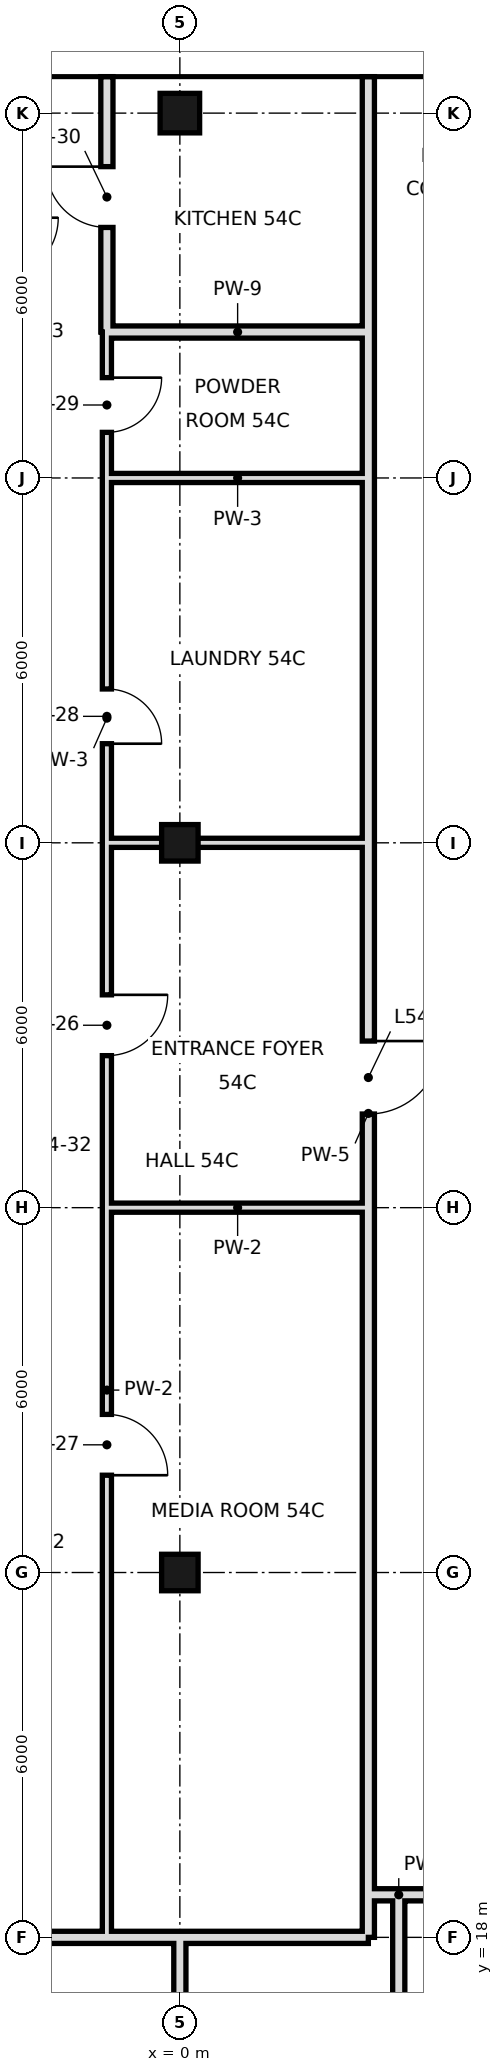
"""IFC4 building model, lengths in metres.
Left out: names, types, materials, properties, quantities, classifications, styles, units other than length and angle.
Written with IfcOpenShell. Run it as: python <this file> out.ifc"""

import sys

from ifc_helpers import new_model, si_unit, direction, frame, frame_2d, origin, origin_2d, place, context, subcontext, project, spatial, rectangle, hollow_rectangle, extrude, element, fill, save


model = new_model("IFC4")
c1 = context("Model", 3, precision=1e-05, world=origin(), true_north=direction((0.0, 1.0)))
c2 = subcontext(c1, "Body", "Model", "MODEL_VIEW")
j1 = project(units=[si_unit("LENGTHUNIT", "METRE"), si_unit("PLANEANGLEUNIT", "RADIAN")], contexts=[c1])
p1 = place(None, origin())
s1 = spatial("IfcSite", under=j1, at=p1, CompositionType="ELEMENT")
p2 = place(p1, origin())
s2 = spatial("IfcBuilding", under=s1, at=p2, CompositionType="ELEMENT")
p3 = place(p2, frame((0.0, 0.0, 229.8)))
s3 = spatial("IfcBuildingStorey", under=s2, at=p3, CompositionType="ELEMENT", Elevation=229.8)
for number, where, z_axis, x_axis in (
    (1, (0.0, 24.0, 0.0), (0.0, 0.0, 1.0), (1.0, 0.0, 0.0)),
    (2, (0.0, 36.0, 0.0), (0.0, 0.0, 1.0), (1.0, 0.0, 0.0)),
):
    element("IfcColumn", number, at=place(p3, frame(where, z_axis=z_axis, x_axis=x_axis)), inside=s3, PredefinedType="COLUMN", context=c2, shape_type="SweptSolid", body=[
        extrude(hollow_rectangle(XDim=0.6, YDim=0.6, WallThickness=0.028, at=origin_2d()), origin(), (0.0, 0.0, 1.0), 4.4),
    ])
p4 = place(p3, frame((0.0, 48.0, 0.0), z_axis=(0.0, 0.0, 1.0), x_axis=(1.0, 0.0, 0.0)))
e3 = element("IfcColumn", 3, at=p4, inside=s3, PredefinedType="COLUMN", context=c2, shape_type="SweptSolid", body=[
    extrude(hollow_rectangle(XDim=0.65, YDim=0.65, WallThickness=0.032, at=origin_2d()), origin(), (0.0, 0.0, 1.0), 4.4),
])
p5 = place(p3, frame((-1.2, 44.4, 0.0), z_axis=(0.0, 0.0, 1.0), x_axis=(0.0, 1.0, 0.0)))
e4 = element("IfcWall", 4, at=p5, inside=s3, PredefinedType="SOLIDWALL", context=c2, shape_type="SweptSolid", body=[
    extrude(rectangle(XDim=4.2, YDim=0.2, at=frame_2d((2.1, 0.0))), origin(), (0.0, 0.0, 1.0), 3.65),
])
p6 = place(p5, frame((1.72, 0.0, 0.0)))
e5 = element("IfcOpeningElement", 5, at=p6, cuts=e4, PredefinedType="OPENING", context=c2, shape_type="SweptSolid", body=[
    extrude(rectangle(XDim=1.0, YDim=2.4, at=frame_2d((0.5, 1.2))), frame((0.0, 0.11, 0.0), z_axis=(0.0, -1.0, 0.0), x_axis=(1.0, 0.0, 0.0)), (0.0, 0.0, 1.0), 0.22),
])
p7 = place(p3, frame((-1.2, 18.0, 0.0), z_axis=(0.0, 0.0, 1.0), x_axis=(0.0, 1.0, 0.0)))
e6 = element("IfcWall", 6, at=p7, inside=s3, PredefinedType="PARTITIONING", context=c2, shape_type="SweptSolid", body=[
    extrude(rectangle(XDim=18.0, YDim=0.15, at=frame_2d((9.0, 0.0))), origin(), (0.0, 0.0, 1.0), 4.1),
])
p8 = place(p7, frame((14.5, 0.0, 0.0)))
e7 = element("IfcOpeningElement", 7, at=p8, cuts=e6, PredefinedType="OPENING", context=c2, shape_type="SweptSolid", body=[
    extrude(rectangle(XDim=1.0, YDim=2.4, at=frame_2d((0.5, 1.2))), frame((0.0, 0.085, 0.0), z_axis=(0.0, -1.0, 0.0), x_axis=(1.0, 0.0, 0.0)), (0.0, 0.0, 1.0), 0.17),
])
p9 = place(p7, frame((7.6, 0.0, 0.0)))
e8 = element("IfcOpeningElement", 8, at=p9, cuts=e6, PredefinedType="OPENING", context=c2, shape_type="SweptSolid", body=[
    extrude(rectangle(XDim=1.0, YDim=2.4, at=frame_2d((0.5, 1.2))), frame((0.0, 0.085, 0.0), z_axis=(0.0, -1.0, 0.0), x_axis=(1.0, 0.0, 0.0)), (0.0, 0.0, 1.0), 0.17),
])
p10 = place(p3, frame((-1.2, 36.0, 0.0), z_axis=(0.0, 0.0, 1.0), x_axis=(0.0, 1.0, 0.0)))
e9 = element("IfcWall", 9, at=p10, inside=s3, PredefinedType="PARTITIONING", context=c2, shape_type="SweptSolid", body=[
    extrude(rectangle(XDim=8.4, YDim=0.15, at=frame_2d((4.2, 0.0))), origin(), (0.0, 0.0, 1.0), 4.1),
])
p11 = place(p10, frame((1.63, 0.0, 0.0)))
e10 = element("IfcOpeningElement", 10, at=p11, cuts=e9, PredefinedType="OPENING", context=c2, shape_type="SweptSolid", body=[
    extrude(rectangle(XDim=0.9, YDim=2.1, at=frame_2d((0.45, 1.05))), frame((0.0, 0.085, 0.0), z_axis=(0.0, -1.0, 0.0), x_axis=(1.0, 0.0, 0.0)), (0.0, 0.0, 1.0), 0.17),
])
p12 = place(p10, frame((6.75, 0.0, 0.0)))
e11 = element("IfcOpeningElement", 11, at=p12, cuts=e9, PredefinedType="OPENING", context=c2, shape_type="SweptSolid", body=[
    extrude(rectangle(XDim=0.9, YDim=2.4, at=frame_2d((0.45, 1.2))), frame((0.0, 0.085, 0.0), z_axis=(0.0, -1.0, 0.0), x_axis=(1.0, 0.0, 0.0)), (0.0, 0.0, 1.0), 0.17),
])
p13 = place(p3, frame((0.0, 10.8, 0.0), z_axis=(0.0, 0.0, 1.0), x_axis=(0.0, 1.0, 0.0)))
e12 = element("IfcWall", 12, at=p13, inside=s3, PredefinedType="SOLIDWALL", context=c2, shape_type="SweptSolid", body=[
    extrude(rectangle(XDim=7.2, YDim=0.2, at=frame_2d((3.6, 0.0))), origin(), (0.0, 0.0, 1.0), 3.4),
])
p14 = place(p3, frame((3.1, 18.7, 0.0), z_axis=(0.0, 0.0, 1.0), x_axis=(0.0, 1.0, 0.0)))
e13 = element("IfcWall", 13, at=p14, inside=s3, PredefinedType="SOLIDWALL", context=c2, shape_type="SweptSolid", body=[
    extrude(rectangle(XDim=25.7, YDim=0.2, at=frame_2d((12.85, 0.0))), origin(), (0.0, 0.0, 1.0), 3.65),
])
p15 = place(p14, frame((12.84, 0.0, 0.0)))
e14 = element("IfcOpeningElement", 14, at=p15, cuts=e13, PredefinedType="OPENING", context=c2, shape_type="SweptSolid", body=[
    extrude(rectangle(XDim=1.2, YDim=2.4, at=frame_2d((0.6, 1.2))), frame((0.0, 0.11, 0.0), z_axis=(0.0, -1.0, 0.0), x_axis=(1.0, 0.0, 0.0)), (0.0, 0.0, 1.0), 0.22),
])
p16 = place(p3, frame((3.1, 18.0, 0.0), z_axis=(0.0, 0.0, 1.0), x_axis=(0.0, 1.0, 0.0)))
e15 = element("IfcWall", 15, at=p16, inside=s3, PredefinedType="SOLIDWALL", context=c2, shape_type="SweptSolid", body=[
    extrude(rectangle(XDim=0.7, YDim=0.2, at=frame_2d((0.35, 0.0))), origin(), (0.0, 0.0, 1.0), 3.65),
])
p17 = place(p3, frame((3.1, 44.4, 0.0), z_axis=(0.0, 0.0, 1.0), x_axis=(0.0, 1.0, 0.0)))
e16 = element("IfcWall", 16, at=p17, inside=s3, PredefinedType="SOLIDWALL", context=c2, shape_type="SweptSolid", body=[
    extrude(rectangle(XDim=4.2, YDim=0.2, at=frame_2d((2.1, 0.0))), origin(), (0.0, 0.0, 1.0), 3.4),
])
p18 = place(p3, frame((3.6, 10.8, 0.0), z_axis=(0.0, 0.0, 1.0), x_axis=(0.0, 1.0, 0.0)))
e17 = element("IfcWall", 17, at=p18, inside=s3, PredefinedType="SOLIDWALL", context=c2, shape_type="SweptSolid", body=[
    extrude(rectangle(XDim=7.9, YDim=0.2, at=frame_2d((3.95, 0.0))), origin(), (0.0, 0.0, 1.0), 3.4),
])
p19 = place(p3, frame((0.0, 18.0, 0.0), z_axis=(0.0, 0.0, 1.0), x_axis=(1.0, 0.0, 0.0)))
e18 = element("IfcWall", 18, at=p19, inside=s3, PredefinedType="SOLIDWALL", context=c2, shape_type="SweptSolid", body=[
    extrude(rectangle(XDim=3.1, YDim=0.2, at=frame_2d((1.55, 0.0))), origin(), (0.0, 0.0, 1.0), 3.4),
])
p20 = place(p3, frame((-12.6, 18.0, 0.0), z_axis=(0.0, 0.0, 1.0), x_axis=(1.0, 0.0, 0.0)))
e19 = element("IfcWall", 19, at=p20, inside=s3, PredefinedType="SOLIDWALL", context=c2, shape_type="SweptSolid", body=[
    extrude(rectangle(XDim=12.6, YDim=0.2, at=frame_2d((6.3, 0.0))), origin(), (0.0, 0.0, 1.0), 3.4),
])
p21 = place(p3, frame((3.6, 18.7, 0.0), z_axis=(0.0, 0.0, 1.0), x_axis=(1.0, 0.0, 0.0)))
e20 = element("IfcWall", 20, at=p21, inside=s3, PredefinedType="SOLIDWALL", context=c2, shape_type="SweptSolid", body=[
    extrude(rectangle(XDim=20.4, YDim=0.2, at=frame_2d((10.2, 0.0))), origin(), (0.0, 0.0, 1.0), 3.4),
])
p22 = place(p21, frame((4.8, 0.0, 0.0)))
e21 = element("IfcOpeningElement", 21, at=p22, cuts=e20, PredefinedType="OPENING", context=c2, shape_type="SweptSolid", body=[
    extrude(rectangle(XDim=1.2, YDim=2.4, at=frame_2d((0.6, 1.2))), frame((0.0, 0.11, 0.0), z_axis=(0.0, -1.0, 0.0), x_axis=(1.0, 0.0, 0.0)), (0.0, 0.0, 1.0), 0.22),
])
p23 = place(p3, frame((3.1, 18.7, 0.0), z_axis=(0.0, 0.0, 1.0), x_axis=(1.0, 0.0, 0.0)))
e22 = element("IfcWall", 22, at=p23, inside=s3, PredefinedType="SOLIDWALL", context=c2, shape_type="SweptSolid", body=[
    extrude(rectangle(XDim=0.5, YDim=0.2, at=frame_2d((0.25, 0.0))), origin(), (0.0, 0.0, 1.0), 4.1),
])
for number, where, z_axis, x_axis in (
    (23, (-1.2, 30.0, 0.0), (0.0, 0.0, 1.0), (1.0, 0.0, 0.0)),
    (24, (-1.2, 36.0, 0.0), (0.0, 0.0, 1.0), (1.0, 0.0, 0.0)),
    (25, (-1.2, 42.0, 0.0), (0.0, 0.0, 1.0), (1.0, 0.0, 0.0)),
):
    element("IfcWall", number, at=place(p3, frame(where, z_axis=z_axis, x_axis=x_axis)), inside=s3, PredefinedType="PARTITIONING", context=c2, shape_type="SweptSolid", body=[
        extrude(rectangle(XDim=4.3, YDim=0.15, at=frame_2d((2.15, 0.0))), origin(), (0.0, 0.0, 1.0), 3.4),
    ])
p24 = place(p3, frame((-1.2, 44.4, 0.0), z_axis=(0.0, 0.0, 1.0), x_axis=(1.0, 0.0, 0.0)))
e26 = element("IfcWall", 26, at=p24, inside=s3, PredefinedType="SOLIDWALL", context=c2, shape_type="SweptSolid", body=[
    extrude(rectangle(XDim=4.3, YDim=0.2, at=frame_2d((2.15, 0.0))), origin(), (0.0, 0.0, 1.0), 3.4),
])
p25 = place(p8, origin())
e27 = element("IfcDoor", 27, at=p25, inside=s3, OperationType="SINGLE_SWING_RIGHT", PredefinedType="DOOR", context=c2, shape_type="SweptSolid", body=[
    extrude(rectangle(XDim=1.0, YDim=2.4, at=frame_2d((0.5, 1.2))), frame((0.0, 0.025, 0.0), z_axis=(0.0, -1.0, 0.0), x_axis=(1.0, 0.0, 0.0)), (0.0, 0.0, 1.0), 0.05),
])
fill(e7, e27)
p26 = place(p9, frame((1.0, 0.0, 0.0), z_axis=(0.0, 0.0, 1.0), x_axis=(-1.0, 0.0, 0.0)))
e28 = element("IfcDoor", 28, at=p26, inside=s3, OperationType="SINGLE_SWING_RIGHT", PredefinedType="DOOR", context=c2, shape_type="SweptSolid", body=[
    extrude(rectangle(XDim=1.0, YDim=2.4, at=frame_2d((0.5, 1.2))), frame((0.0, 0.025, 0.0), z_axis=(0.0, -1.0, 0.0), x_axis=(1.0, 0.0, 0.0)), (0.0, 0.0, 1.0), 0.05),
])
fill(e8, e28)
p27 = place(p11, frame((0.9, 0.0, 0.0), z_axis=(0.0, 0.0, 1.0), x_axis=(-1.0, 0.0, 0.0)))
e29 = element("IfcDoor", 29, at=p27, inside=s3, OperationType="SINGLE_SWING_RIGHT", PredefinedType="DOOR", context=c2, shape_type="SweptSolid", body=[
    extrude(rectangle(XDim=0.9, YDim=2.1, at=frame_2d((0.45, 1.05))), frame((0.0, 0.025, 0.0), z_axis=(0.0, -1.0, 0.0), x_axis=(1.0, 0.0, 0.0)), (0.0, 0.0, 1.0), 0.05),
])
fill(e10, e29)
p28 = place(p12, origin())
e30 = element("IfcDoor", 30, at=p28, inside=s3, OperationType="SINGLE_SWING_RIGHT", PredefinedType="DOOR", context=c2, shape_type="SweptSolid", body=[
    extrude(rectangle(XDim=0.9, YDim=2.4, at=frame_2d((0.45, 1.2))), frame((0.0, 0.025, 0.0), z_axis=(0.0, -1.0, 0.0), x_axis=(1.0, 0.0, 0.0)), (0.0, 0.0, 1.0), 0.05),
])
fill(e11, e30)
p29 = place(p6, frame((1.0, 0.0, 0.0), z_axis=(0.0, 0.0, 1.0), x_axis=(-1.0, 0.0, 0.0)))
e31 = element("IfcDoor", 31, at=p29, inside=s3, OperationType="SINGLE_SWING_LEFT", PredefinedType="DOOR", context=c2, shape_type="SweptSolid", body=[
    extrude(rectangle(XDim=1.0, YDim=2.4, at=frame_2d((0.5, 1.2))), frame((0.0, 0.025, 0.0), z_axis=(0.0, -1.0, 0.0), x_axis=(1.0, 0.0, 0.0)), (0.0, 0.0, 1.0), 0.05),
])
fill(e5, e31)
p30 = place(p15, origin())
e32 = element("IfcDoor", 32, at=p30, inside=s3, OperationType="SINGLE_SWING_RIGHT", PredefinedType="DOOR", context=c2, shape_type="SweptSolid", body=[
    extrude(rectangle(XDim=1.2, YDim=2.4, at=frame_2d((0.6, 1.2))), frame((0.0, 0.025, 0.0), z_axis=(0.0, -1.0, 0.0), x_axis=(1.0, 0.0, 0.0)), (0.0, 0.0, 1.0), 0.05),
])
fill(e14, e32)
save(model, sys.argv[1])
